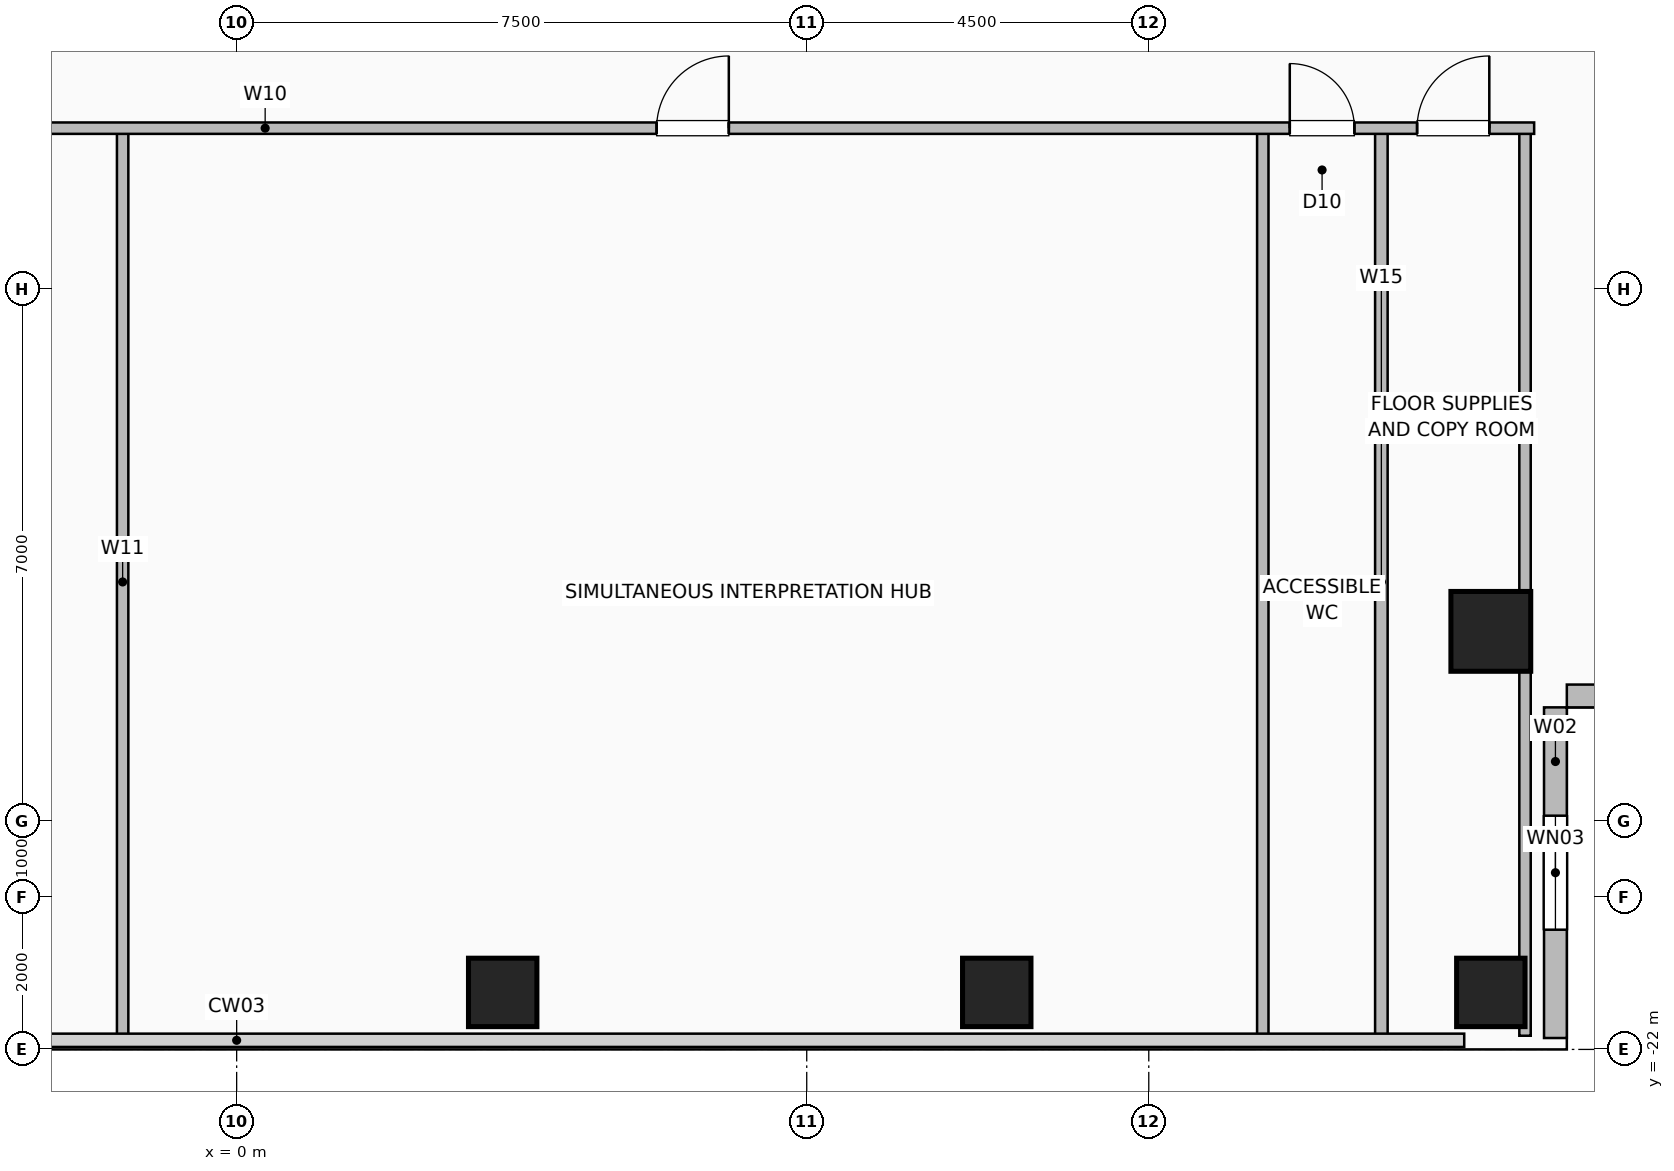
"""IFC4 building model, lengths in metres.
Left out: names, types, materials, properties, quantities, classifications, styles, units other than length and angle.
Written with IfcOpenShell. Run it as: python <this file> out.ifc"""

import sys

from ifc_helpers import new_model, si_unit, direction, frame, frame_2d, origin, origin_2d, place, context, subcontext, project, spatial, rectangle, hollow_rectangle, extrude, element, fill, save


model = new_model("IFC4")
c1 = context("Model", 3, precision=1e-05, world=origin(), true_north=direction((0.0, 1.0)))
c2 = subcontext(c1, "Body", "Model", "MODEL_VIEW")
j1 = project(units=[si_unit("LENGTHUNIT", "METRE"), si_unit("PLANEANGLEUNIT", "RADIAN")], contexts=[c1])
p1 = place(None, origin())
s1 = spatial("IfcSite", under=j1, at=p1, CompositionType="ELEMENT")
p2 = place(p1, origin())
s2 = spatial("IfcBuilding", under=s1, at=p2, CompositionType="ELEMENT")
p3 = place(p2, frame((0.0, 0.0, 97.6)))
s3 = spatial("IfcBuildingStorey", under=s2, at=p3, CompositionType="ELEMENT", Elevation=97.6)
for number, where, z_axis, x_axis in (
    (1, (3.5, -21.25, 0.0), (0.0, 0.0, 1.0), (1.0, 0.0, 0.0)),
    (2, (10.0, -21.25, 0.0), (0.0, 0.0, 1.0), (1.0, 0.0, 0.0)),
    (3, (16.5, -21.25, 0.0), (0.0, 0.0, 1.0), (1.0, 0.0, 0.0)),
):
    element("IfcColumn", number, at=place(p3, frame(where, z_axis=z_axis, x_axis=x_axis)), inside=s3, PredefinedType="COLUMN", context=c2, shape_type="SweptSolid", body=[
        extrude(hollow_rectangle(XDim=0.9, YDim=0.9, WallThickness=0.045, at=origin_2d()), origin(), (0.0, 0.0, 1.0), 3.6),
    ])
p4 = place(p3, frame((16.5, -16.5, 0.0), z_axis=(0.0, 0.0, 1.0), x_axis=(1.0, 0.0, 0.0)))
e4 = element("IfcColumn", 4, at=p4, inside=s3, PredefinedType="COLUMN", context=c2, shape_type="SweptSolid", body=[
    extrude(hollow_rectangle(XDim=1.05, YDim=1.05, WallThickness=0.05, at=origin_2d()), origin(), (0.0, 0.0, 1.0), 3.6),
])
p5 = place(p3, frame((17.35, -21.85, 0.0), z_axis=(0.0, 0.0, 1.0), x_axis=(0.0, 1.0, 0.0)))
e5 = element("IfcWall", 5, at=p5, inside=s3, PredefinedType="SOLIDWALL", context=c2, shape_type="SweptSolid", body=[
    extrude(rectangle(XDim=4.35, YDim=0.3, at=frame_2d((2.175, 0.0))), origin(), (0.0, 0.0, 1.0), 3.36),
])
p6 = place(p5, frame((1.425, 0.0, 0.9)))
e6 = element("IfcOpeningElement", 6, at=p6, cuts=e5, PredefinedType="OPENING", context=c2, shape_type="SweptSolid", body=[
    extrude(rectangle(XDim=1.5, YDim=1.8, at=frame_2d((0.75, 0.9))), frame((0.0, 0.16, 0.0), z_axis=(0.0, -1.0, 0.0), x_axis=(1.0, 0.0, 0.0)), (0.0, 0.0, 1.0), 0.32),
])
p7 = place(p3, frame((21.85, -17.35, 0.0), z_axis=(0.0, 0.0, 1.0), x_axis=(-1.0, 0.0, 0.0)))
e7 = element("IfcWall", 7, at=p7, inside=s3, PredefinedType="SOLIDWALL", context=c2, shape_type="SweptSolid", body=[
    extrude(rectangle(XDim=4.35, YDim=0.3, at=frame_2d((2.175, 0.0))), origin(), (0.0, 0.0, 1.0), 3.36),
])
p8 = place(p3, frame((15.06, -21.82, 0.0), z_axis=(0.0, 0.0, 1.0), x_axis=(0.0, 1.0, 0.0)))
e8 = element("IfcWall", 8, at=p8, inside=s3, PredefinedType="PLUMBINGWALL", context=c2, shape_type="SweptSolid", body=[
    extrude(rectangle(XDim=11.94, YDim=0.165, at=frame_2d((5.97, 0.0))), origin(), (0.0, 0.0, 1.0), 3.36),
])
for number, where, z_axis, x_axis in (
    (9, (-1.5, -21.82, 0.0), (0.0, 0.0, 1.0), (0.0, 1.0, 0.0)),
    (10, (13.5, -21.82, 0.0), (0.0, 0.0, 1.0), (0.0, 1.0, 0.0)),
    (11, (16.95, -21.82, 0.0), (0.0, 0.0, 1.0), (0.0, 1.0, 0.0)),
):
    element("IfcWall", number, at=place(p3, frame(where, z_axis=z_axis, x_axis=x_axis)), inside=s3, PredefinedType="PARTITIONING", context=c2, shape_type="SweptSolid", body=[
        extrude(rectangle(XDim=11.94, YDim=0.15, at=frame_2d((5.97, 0.0))), origin(), (0.0, 0.0, 1.0), 3.36),
    ])
p9 = place(p3, frame((-17.07, -9.88, 0.0), z_axis=(0.0, 0.0, 1.0), x_axis=(1.0, 0.0, 0.0)))
e12 = element("IfcWall", 12, at=p9, inside=s3, PredefinedType="PARTITIONING", context=c2, shape_type="SweptSolid", body=[
    extrude(rectangle(XDim=34.14, YDim=0.15, at=frame_2d((17.07, 0.0))), origin(), (0.0, 0.0, 1.0), 3.36),
])
p10 = place(p9, frame((3.195, 0.0, 0.0)))
e13 = element("IfcOpeningElement", 13, at=p10, cuts=e12, PredefinedType="OPENING", context=c2, shape_type="SweptSolid", body=[
    extrude(rectangle(XDim=1.8, YDim=2.08, at=frame_2d((0.9, 1.04))), frame((0.0, 0.085, 0.0), z_axis=(0.0, -1.0, 0.0), x_axis=(1.0, 0.0, 0.0)), (0.0, 0.0, 1.0), 0.17),
])
p11 = place(p9, frame((11.345, 0.0, 0.0)))
e14 = element("IfcOpeningElement", 14, at=p11, cuts=e12, PredefinedType="OPENING", context=c2, shape_type="SweptSolid", body=[
    extrude(rectangle(XDim=0.95, YDim=2.06, at=frame_2d((0.475, 1.03))), frame((0.0, 0.085, 0.0), z_axis=(0.0, -1.0, 0.0), x_axis=(1.0, 0.0, 0.0)), (0.0, 0.0, 1.0), 0.17),
])
p12 = place(p9, frame((22.595, 0.0, 0.0)))
e15 = element("IfcOpeningElement", 15, at=p12, cuts=e12, PredefinedType="OPENING", context=c2, shape_type="SweptSolid", body=[
    extrude(rectangle(XDim=0.95, YDim=2.06, at=frame_2d((0.475, 1.03))), frame((0.0, 0.085, 0.0), z_axis=(0.0, -1.0, 0.0), x_axis=(1.0, 0.0, 0.0)), (0.0, 0.0, 1.0), 0.17),
])
p13 = place(p9, frame((30.925, 0.0, 0.0)))
e16 = element("IfcOpeningElement", 16, at=p13, cuts=e12, PredefinedType="OPENING", context=c2, shape_type="SweptSolid", body=[
    extrude(rectangle(XDim=0.85, YDim=2.05, at=frame_2d((0.425, 1.025))), frame((0.0, 0.085, 0.0), z_axis=(0.0, -1.0, 0.0), x_axis=(1.0, 0.0, 0.0)), (0.0, 0.0, 1.0), 0.17),
])
p14 = place(p9, frame((32.6, 0.0, 0.0)))
e17 = element("IfcOpeningElement", 17, at=p14, cuts=e12, PredefinedType="OPENING", context=c2, shape_type="SweptSolid", body=[
    extrude(rectangle(XDim=0.95, YDim=2.06, at=frame_2d((0.475, 1.03))), frame((0.0, 0.085, 0.0), z_axis=(0.0, -1.0, 0.0), x_axis=(1.0, 0.0, 0.0)), (0.0, 0.0, 1.0), 0.17),
])
p15 = place(p6, origin())
e18 = element("IfcWindow", 18, at=p15, inside=s3, PartitioningType="SINGLE_PANEL", PredefinedType="WINDOW", context=c2, shape_type="SweptSolid", body=[
    extrude(rectangle(XDim=1.5, YDim=1.8, at=frame_2d((0.75, 0.9))), frame((0.0, 0.03, 0.0), z_axis=(0.0, -1.0, 0.0), x_axis=(1.0, 0.0, 0.0)), (0.0, 0.0, 1.0), 0.06),
])
fill(e6, e18)
p16 = place(p12, origin())
e19 = element("IfcDoor", 19, at=p16, inside=s3, OperationType="SINGLE_SWING_RIGHT", PredefinedType="DOOR", context=c2, shape_type="SweptSolid", body=[
    extrude(rectangle(XDim=0.95, YDim=2.06, at=frame_2d((0.475, 1.03))), frame((0.0, 0.025, 0.0), z_axis=(0.0, -1.0, 0.0), x_axis=(1.0, 0.0, 0.0)), (0.0, 0.0, 1.0), 0.05),
])
fill(e15, e19)
p17 = place(p13, origin())
e20 = element("IfcDoor", 20, at=p17, inside=s3, OperationType="SINGLE_SWING_LEFT", PredefinedType="DOOR", context=c2, shape_type="SweptSolid", body=[
    extrude(rectangle(XDim=0.85, YDim=2.05, at=frame_2d((0.425, 1.025))), frame((0.0, 0.025, 0.0), z_axis=(0.0, -1.0, 0.0), x_axis=(1.0, 0.0, 0.0)), (0.0, 0.0, 1.0), 0.05),
])
fill(e16, e20)
p18 = place(p14, origin())
e21 = element("IfcDoor", 21, at=p18, inside=s3, OperationType="SINGLE_SWING_RIGHT", PredefinedType="DOOR", context=c2, shape_type="SweptSolid", body=[
    extrude(rectangle(XDim=0.95, YDim=2.06, at=frame_2d((0.475, 1.03))), frame((0.0, 0.025, 0.0), z_axis=(0.0, -1.0, 0.0), x_axis=(1.0, 0.0, 0.0)), (0.0, 0.0, 1.0), 0.05),
])
fill(e17, e21)
save(model, sys.argv[1])
